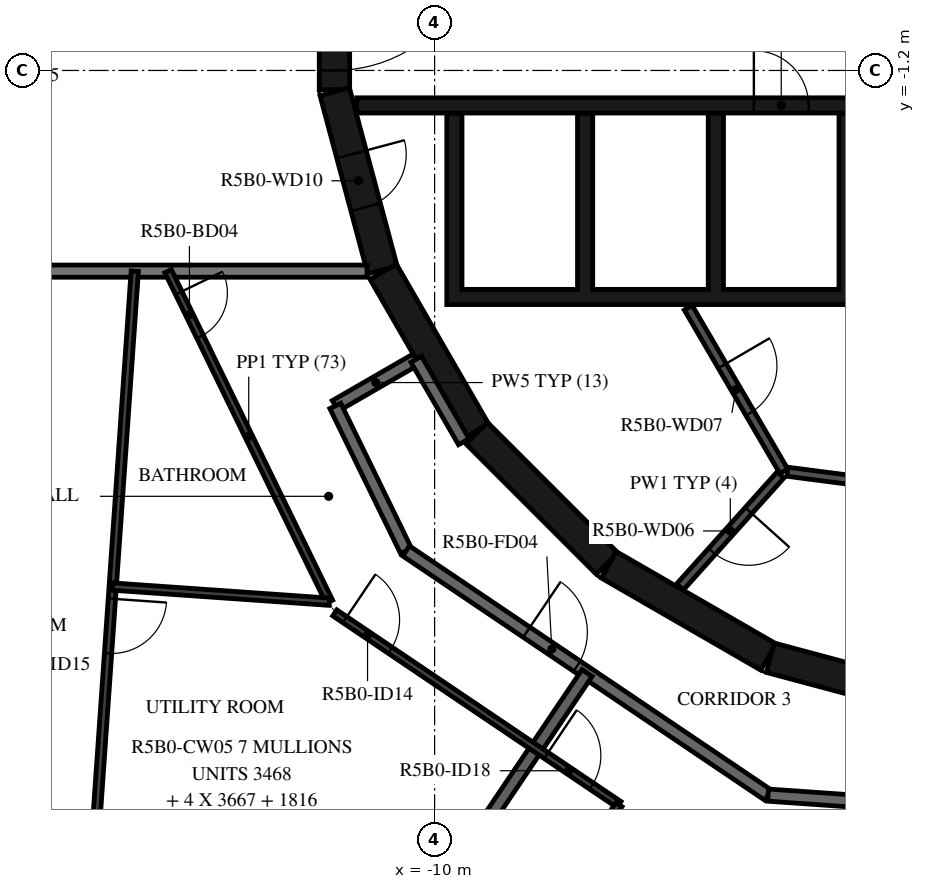
"""IFC4 building model, lengths in metres.
Left out: names, types, materials, properties, quantities, classifications, styles, units other than length and angle.
Written with IfcOpenShell. Run it as: python <this file> out.ifc"""

import sys

from ifc_helpers import new_model, si_unit, direction, frame, frame_2d, origin, place, context, subcontext, project, spatial, polyline, rectangle, outline, extrude, element, fill, save


model = new_model("IFC4")
c1 = context("Model", 3, precision=1e-05, world=origin(), true_north=direction((0.0, 1.0)))
c2 = subcontext(c1, "Body", "Model", "MODEL_VIEW")
j1 = project(units=[si_unit("LENGTHUNIT", "METRE"), si_unit("PLANEANGLEUNIT", "RADIAN")], contexts=[c1])
p1 = place(None, origin())
s1 = spatial("IfcSite", under=j1, at=p1, CompositionType="ELEMENT")
p2 = place(p1, origin())
s2 = spatial("IfcBuilding", under=s1, at=p2, CompositionType="ELEMENT")
p3 = place(p2, frame((0.0, 0.0, 202.4)))
s3 = spatial("IfcBuildingStorey", under=s2, at=p3, CompositionType="ELEMENT", Elevation=202.4)
p4 = place(p3, frame((-11.647, 1.516, 0.0), z_axis=(0.0, 0.0, 1.0), x_axis=(0.0, -1.0, 0.0)))
e1 = element("IfcWall", 1, at=p4, inside=s3, PredefinedType="SHEAR", context=c2, shape_type="SweptSolid", body=[
    extrude(rectangle(XDim=3.033, YDim=0.5, at=frame_2d((1.516, 0.0))), origin(), (0.0, 0.0, 1.0), 3.12),
])
p5 = place(p4, frame((0.316, 0.0, 0.0)))
e2 = element("IfcOpeningElement", 2, at=p5, cuts=e1, PredefinedType="OPENING", context=c2, shape_type="SweptSolid", body=[
    extrude(rectangle(XDim=2.4, YDim=2.1, at=frame_2d((1.2, 1.05))), frame((0.0, 0.26, 0.0), z_axis=(0.0, -1.0, 0.0), x_axis=(1.0, 0.0, 0.0)), (0.0, 0.0, 1.0), 0.52),
])
p6 = place(p3, frame((-11.643, -1.55, 0.0), z_axis=(0.0, 0.0, 1.0), x_axis=(0.258734743916, -0.965948410781, 0.0)))
e3 = element("IfcWall", 3, at=p6, inside=s3, PredefinedType="SHEAR", context=c2, shape_type="SweptSolid", body=[
    extrude(rectangle(XDim=3.033, YDim=0.5, at=frame_2d((1.516, 0.0))), origin(), (0.0, 0.0, 1.0), 3.12),
])
p7 = place(p6, frame((1.066, 0.0, 0.0)))
e4 = element("IfcOpeningElement", 4, at=p7, cuts=e3, PredefinedType="OPENING", context=c2, shape_type="SweptSolid", body=[
    extrude(rectangle(XDim=0.9, YDim=2.1, at=frame_2d((0.45, 1.05))), frame((0.0, 0.26, 0.0), z_axis=(0.0, -1.0, 0.0), x_axis=(1.0, 0.0, 0.0)), (0.0, 0.0, 1.0), 0.52),
])
p8 = place(p3, frame((-10.845, -4.51, 0.0), z_axis=(0.0, 0.0, 1.0), x_axis=(0.500087131594, -0.865975092491, 0.0)))
e5 = element("IfcWall", 5, at=p8, inside=s3, PredefinedType="SHEAR", context=c2, shape_type="SweptSolid", body=[
    extrude(rectangle(XDim=3.033, YDim=0.5, at=frame_2d((1.516, 0.0))), origin(), (0.0, 0.0, 1.0), 3.12),
])
p9 = place(p3, frame((-9.308, -7.164, 0.0), z_axis=(0.0, 0.0, 1.0), x_axis=(0.707106781187, -0.707106781187, 0.0)))
e6 = element("IfcWall", 6, at=p9, inside=s3, PredefinedType="SHEAR", context=c2, shape_type="SweptSolid", body=[
    extrude(rectangle(XDim=3.032, YDim=0.5, at=frame_2d((1.516, 0.0))), origin(), (0.0, 0.0, 1.0), 3.12),
])
for number, where, z_axis, x_axis in (
    (7, (-7.137, -9.329, 0.0), (0.0, 0.0, 1.0), (0.866, -0.5, 0.0)),
    (8, (-4.479, -10.858, 0.0), (0.0, 0.0, 1.0), (0.966, -0.259, 0.0)),
):
    element("IfcWall", number, at=place(p3, frame(where, z_axis=z_axis, x_axis=x_axis)), inside=s3, PredefinedType="SHEAR", context=c2, shape_type="SweptSolid", body=[
        extrude(rectangle(XDim=3.033, YDim=0.5, at=frame_2d((1.516, 0.0))), origin(), (0.0, 0.0, 1.0), 3.12),
    ])
p10 = place(p3, origin())
e9 = element("IfcWall", 9, at=p10, inside=s3, PredefinedType="SHEAR", context=c2, shape_type="SweptSolid", body=[
    extrude(outline(polyline([(9.8, -5.05), (9.8, -4.8), (9.8, -1.9), (9.55, -1.9), (9.55, -4.8), (7.65, -4.8), (7.65, -1.9), (7.4, -1.9), (7.4, -4.8), (5.5, -4.8), (5.5, -1.9), (5.25, -1.9), (5.25, -4.8), (3.35, -4.8), (3.35, -1.9), (3.1, -1.9), (3.1, -4.8), (1.2, -4.8), (1.2, -1.9), (0.95, -1.9), (0.95, -4.8), (-0.95, -4.8), (-0.95, -1.9), (-1.2, -1.9), (-1.2, -4.8), (-3.1, -4.8), (-3.1, -1.9), (-3.35, -1.9), (-3.35, -4.8), (-5.25, -4.8), (-5.25, -1.9), (-5.5, -1.9), (-5.5, -4.8), (-7.4, -4.8), (-7.4, -1.9), (-7.65, -1.9), (-7.65, -4.8), (-9.55, -4.8), (-9.55, -1.9), (-9.8, -1.9), (-9.8, -4.8), (-9.8, -5.05), (9.8, -5.05)])), origin(), (0.0, 0.0, 1.0), 3.12),
])
p11 = place(p3, frame((-11.28, -1.775, 0.0), z_axis=(0.0, 0.0, 1.0), x_axis=(1.0, 0.0, 0.0)))
e10 = element("IfcWall", 10, at=p11, inside=s3, PredefinedType="SHEAR", context=c2, shape_type="SweptSolid", body=[
    extrude(rectangle(XDim=14.38, YDim=0.25, at=frame_2d((7.19, 0.0))), origin(), (0.0, 0.0, 1.0), 3.12),
])
p12 = place(p11, frame((12.88, 0.0, 0.0)))
e11 = element("IfcOpeningElement", 11, at=p12, cuts=e10, PredefinedType="OPENING", context=c2, shape_type="SweptSolid", body=[
    extrude(rectangle(XDim=1.1, YDim=2.1, at=frame_2d((0.55, 1.05))), frame((0.0, 0.135, 0.0), z_axis=(0.0, -1.0, 0.0), x_axis=(1.0, 0.0, 0.0)), (0.0, 0.0, 1.0), 0.27),
])
p13 = place(p11, frame((6.53, 0.0, 0.0)))
e12 = element("IfcOpeningElement", 12, at=p13, cuts=e10, PredefinedType="OPENING", context=c2, shape_type="SweptSolid", body=[
    extrude(rectangle(XDim=0.9, YDim=2.1, at=frame_2d((0.45, 1.05))), frame((0.0, 0.135, 0.0), z_axis=(0.0, -1.0, 0.0), x_axis=(1.0, 0.0, 0.0)), (0.0, 0.0, 1.0), 0.27),
])
p14 = place(p11, frame((8.68, 0.0, 0.0)))
e13 = element("IfcOpeningElement", 13, at=p14, cuts=e10, PredefinedType="OPENING", context=c2, shape_type="SweptSolid", body=[
    extrude(rectangle(XDim=0.9, YDim=2.1, at=frame_2d((0.45, 1.05))), frame((0.0, 0.135, 0.0), z_axis=(0.0, -1.0, 0.0), x_axis=(1.0, 0.0, 0.0)), (0.0, 0.0, 1.0), 0.27),
])
p15 = place(p11, frame((10.83, 0.0, 0.0)))
e14 = element("IfcOpeningElement", 14, at=p15, cuts=e10, PredefinedType="OPENING", context=c2, shape_type="SweptSolid", body=[
    extrude(rectangle(XDim=0.9, YDim=2.1, at=frame_2d((0.45, 1.05))), frame((0.0, 0.135, 0.0), z_axis=(0.0, -1.0, 0.0), x_axis=(1.0, 0.0, 0.0)), (0.0, 0.0, 1.0), 0.27),
])
p16 = place(p3, frame((-5.829, -5.102, 0.0), z_axis=(0.0, 0.0, 1.0), x_axis=(0.504480008384, -0.863423373057, 0.0)))
e15 = element("IfcWall", 15, at=p16, inside=s3, PredefinedType="PARTITIONING", context=c2, shape_type="SweptSolid", body=[
    extrude(rectangle(XDim=3.115, YDim=0.15, at=frame_2d((1.558, 0.0))), origin(), (0.0, 0.0, 1.0), 3.12),
])
p17 = place(p16, frame((1.107, 0.0, 0.0)))
e16 = element("IfcOpeningElement", 16, at=p17, cuts=e15, PredefinedType="OPENING", context=c2, shape_type="SweptSolid", body=[
    extrude(rectangle(XDim=0.9, YDim=2.1, at=frame_2d((0.45, 1.05))), frame((0.0, 0.085, 0.0), z_axis=(0.0, -1.0, 0.0), x_axis=(1.0, 0.0, 0.0)), (0.0, 0.0, 1.0), 0.17),
])
p18 = place(p3, frame((-4.311, -7.851, 0.0), z_axis=(0.0, 0.0, 1.0), x_axis=(-0.667869133096, -0.744278725383, 0.0)))
e17 = element("IfcWall", 17, at=p18, inside=s3, PredefinedType="PARTITIONING", context=c2, shape_type="SweptSolid", body=[
    extrude(rectangle(XDim=2.476, YDim=0.15, at=frame_2d((1.238, 0.0))), origin(), (0.0, 0.0, 1.0), 3.12),
])
p19 = place(p18, frame((0.788, 0.0, 0.0)))
e18 = element("IfcOpeningElement", 18, at=p19, cuts=e17, PredefinedType="OPENING", context=c2, shape_type="SweptSolid", body=[
    extrude(rectangle(XDim=0.9, YDim=2.1, at=frame_2d((0.45, 1.05))), frame((0.0, 0.085, 0.0), z_axis=(0.0, -1.0, 0.0), x_axis=(1.0, 0.0, 0.0)), (0.0, 0.0, 1.0), 0.17),
])
p20 = place(p3, frame((-4.198, -7.799, 0.0), z_axis=(0.0, 0.0, 1.0), x_axis=(0.991686747293, -0.128675542523, 0.0)))
e19 = element("IfcWall", 19, at=p20, inside=s3, PredefinedType="PARTITIONING", context=c2, shape_type="SweptSolid", body=[
    extrude(rectangle(XDim=1.793, YDim=0.15, at=frame_2d((0.896, 0.0))), origin(), (0.0, 0.0, 1.0), 3.12),
])
p21 = place(p3, frame((-10.303, -5.949, 0.0), z_axis=(0.0, 0.0, 1.0), x_axis=(-0.866042588199, -0.499970234539, 0.0)))
e20 = element("IfcWall", 20, at=p21, inside=s3, PredefinedType="STANDARD", context=c2, shape_type="SweptSolid", body=[
    extrude(rectangle(XDim=1.535, YDim=0.2, at=frame_2d((0.768, 0.0))), origin(), (0.0, 0.0, 1.0), 3.12),
])
p22 = place(p3, frame((-11.633, -6.716, 0.0), z_axis=(0.0, 0.0, 1.0), x_axis=(0.438322116278, -0.898817958422, 0.0)))
e21 = element("IfcWall", 21, at=p22, inside=s3, PredefinedType="STANDARD", context=c2, shape_type="SweptSolid", body=[
    extrude(rectangle(XDim=2.654, YDim=0.2, at=frame_2d((1.327, 0.0))), origin(), (0.0, 0.0, 1.0), 3.12),
])
p23 = place(p3, frame((-10.47, -9.101, 0.0), z_axis=(0.0, 0.0, 1.0), x_axis=(0.829035841718, -0.559195469534, 0.0)))
e22 = element("IfcWall", 22, at=p23, inside=s3, PredefinedType="STANDARD", context=c2, shape_type="SweptSolid", body=[
    extrude(rectangle(XDim=7.181, YDim=0.2, at=frame_2d((3.591, 0.0))), origin(), (0.0, 0.0, 1.0), 3.12),
])
p24 = place(p23, frame((2.39, 0.0, 0.0)))
e23 = element("IfcOpeningElement", 23, at=p24, cuts=e22, PredefinedType="OPENING", context=c2, shape_type="SweptSolid", body=[
    extrude(rectangle(XDim=1.0, YDim=2.1, at=frame_2d((0.5, 1.05))), frame((0.0, 0.11, 0.0), z_axis=(0.0, -1.0, 0.0), x_axis=(1.0, 0.0, 0.0)), (0.0, 0.0, 1.0), 0.22),
])
p25 = place(p3, frame((-9.52, -7.305, 0.0), z_axis=(0.0, 0.0, 1.0), x_axis=(-0.500028278809, 0.866009076391, 0.0)))
e24 = element("IfcWall", 24, at=p25, inside=s3, PredefinedType="STANDARD", context=c2, shape_type="SweptSolid", body=[
    extrude(rectangle(XDim=1.566, YDim=0.2, at=frame_2d((0.783, 0.0))), origin(), (0.0, 0.0, 1.0), 3.12),
])
p26 = place(p3, frame((-4.517, -13.117, 0.0), z_axis=(0.0, 0.0, 1.0), x_axis=(0.997564669554, -0.069747616856, 0.0)))
e25 = element("IfcWall", 25, at=p26, inside=s3, PredefinedType="STANDARD", context=c2, shape_type="SweptSolid", body=[
    extrude(rectangle(XDim=6.885, YDim=0.2, at=frame_2d((3.443, 0.0))), origin(), (0.0, 0.0, 1.0), 3.12),
])
p27 = place(p26, frame((3.2, 0.0, 0.0)))
e26 = element("IfcOpeningElement", 26, at=p27, cuts=e25, PredefinedType="OPENING", context=c2, shape_type="SweptSolid", body=[
    extrude(rectangle(XDim=1.0, YDim=2.1, at=frame_2d((0.5, 1.05))), frame((0.0, 0.11, 0.0), z_axis=(0.0, -1.0, 0.0), x_axis=(1.0, 0.0, 0.0)), (0.0, 0.0, 1.0), 0.22),
])
p28 = place(p3, frame((-18.55, -4.5, 0.0), z_axis=(0.0, 0.0, 1.0), x_axis=(1.0, 0.0, 0.0)))
e27 = element("IfcWall", 27, at=p28, inside=s3, PredefinedType="STANDARD", context=c2, shape_type="SweptSolid", body=[
    extrude(rectangle(XDim=7.438, YDim=0.2, at=frame_2d((3.719, 0.0))), origin(), (0.0, 0.0, 1.0), 3.12),
])
p29 = place(p3, frame((-10.066, -14.924, 0.0), z_axis=(0.0, 0.0, 1.0), x_axis=(0.559173899945, 0.829050390278, 0.0)))
e28 = element("IfcWall", 28, at=p29, inside=s3, PredefinedType="STANDARD", context=c2, shape_type="SweptSolid", body=[
    extrude(rectangle(XDim=4.601, YDim=0.2, at=frame_2d((2.301, 0.0))), origin(), (0.0, 0.0, 1.0), 3.12),
])
p30 = place(p3, frame((-14.383, -4.5, 0.0), z_axis=(0.0, 0.0, 1.0), x_axis=(0.438393414895, -0.898783185077, 0.0)))
e29 = element("IfcWall", 29, at=p30, inside=s3, PredefinedType="PARTITIONING", context=c2, shape_type="SweptSolid", body=[
    extrude(rectangle(XDim=6.049, YDim=0.12, at=frame_2d((3.024, 0.0))), origin(), (0.0, 0.0, 1.0), 3.12),
])
p31 = place(p30, frame((0.4, 0.0, 0.0)))
e30 = element("IfcOpeningElement", 30, at=p31, cuts=e29, PredefinedType="OPENING", context=c2, shape_type="SweptSolid", body=[
    extrude(rectangle(XDim=0.8, YDim=2.1, at=frame_2d((0.4, 1.05))), frame((0.0, 0.07, 0.0), z_axis=(0.0, -1.0, 0.0), x_axis=(1.0, 0.0, 0.0)), (0.0, 0.0, 1.0), 0.14),
])
p32 = place(p3, frame((-11.642, -10.12, 0.0), z_axis=(0.0, 0.0, 1.0), x_axis=(0.829033377599, -0.559199122698, 0.0)))
e31 = element("IfcWall", 31, at=p32, inside=s3, PredefinedType="PARTITIONING", context=c2, shape_type="SweptSolid", body=[
    extrude(rectangle(XDim=5.638, YDim=0.12, at=frame_2d((2.819, 0.0))), origin(), (0.0, 0.0, 1.0), 3.12),
])
p33 = place(p32, frame((0.2, 0.0, 0.0)))
e32 = element("IfcOpeningElement", 32, at=p33, cuts=e31, PredefinedType="OPENING", context=c2, shape_type="SweptSolid", body=[
    extrude(rectangle(XDim=0.9, YDim=2.1, at=frame_2d((0.45, 1.05))), frame((0.0, 0.07, 0.0), z_axis=(0.0, -1.0, 0.0), x_axis=(1.0, 0.0, 0.0)), (0.0, 0.0, 1.0), 0.14),
])
p34 = place(p32, frame((4.192, 0.0, 0.0)))
e33 = element("IfcOpeningElement", 33, at=p34, cuts=e31, PredefinedType="OPENING", context=c2, shape_type="SweptSolid", body=[
    extrude(rectangle(XDim=0.9, YDim=2.1, at=frame_2d((0.45, 1.05))), frame((0.0, 0.07, 0.0), z_axis=(0.0, -1.0, 0.0), x_axis=(1.0, 0.0, 0.0)), (0.0, 0.0, 1.0), 0.14),
])
p35 = place(p3, frame((-14.931, -4.5, 0.0), z_axis=(0.0, 0.0, 1.0), x_axis=(-0.069751708439, -0.997564383471, 0.0)))
e34 = element("IfcWall", 34, at=p35, inside=s3, PredefinedType="PARTITIONING", context=c2, shape_type="SweptSolid", body=[
    extrude(rectangle(XDim=11.894, YDim=0.12, at=frame_2d((5.947, 0.0))), origin(), (0.0, 0.0, 1.0), 3.12),
])
p36 = place(p35, frame((5.4, 0.0, 0.0)))
e35 = element("IfcOpeningElement", 35, at=p36, cuts=e34, PredefinedType="OPENING", context=c2, shape_type="SweptSolid", body=[
    extrude(rectangle(XDim=0.9, YDim=2.1, at=frame_2d((0.45, 1.05))), frame((0.0, 0.07, 0.0), z_axis=(0.0, -1.0, 0.0), x_axis=(1.0, 0.0, 0.0)), (0.0, 0.0, 1.0), 0.14),
])
p37 = place(p3, frame((-15.294, -9.688, 0.0), z_axis=(0.0, 0.0, 1.0), x_axis=(0.997565819809, -0.069731163391, 0.0)))
e36 = element("IfcWall", 36, at=p37, inside=s3, PredefinedType="PARTITIONING", context=c2, shape_type="SweptSolid", body=[
    extrude(rectangle(XDim=3.571, YDim=0.12, at=frame_2d((1.786, 0.0))), origin(), (0.0, 0.0, 1.0), 3.12),
])
p38 = place(p3, frame((-6.968, -13.273, 0.0), z_axis=(0.0, 0.0, 1.0), x_axis=(-0.559283007371, -0.828976789582, 0.0)))
e37 = element("IfcWall", 37, at=p38, inside=s3, PredefinedType="PARTITIONING", context=c2, shape_type="SweptSolid", body=[
    extrude(rectangle(XDim=1.325, YDim=0.12, at=frame_2d((0.663, 0.0))), origin(), (0.0, 0.0, 1.0), 3.12),
])
p39 = place(p5, origin())
e38 = element("IfcDoor", 38, at=p39, inside=s3, OperationType="DOUBLE_DOOR_SINGLE_SWING", PredefinedType="DOOR", context=c2, shape_type="SweptSolid", body=[
    extrude(rectangle(XDim=2.4, YDim=2.1, at=frame_2d((1.2, 1.05))), frame((0.0, 0.025, 0.0), z_axis=(0.0, -1.0, 0.0), x_axis=(1.0, 0.0, 0.0)), (0.0, 0.0, 1.0), 0.05),
])
fill(e2, e38)
p40 = place(p13, origin())
e39 = element("IfcDoor", 39, at=p40, inside=s3, OperationType="SINGLE_SWING_LEFT", PredefinedType="DOOR", context=c2, shape_type="SweptSolid", body=[
    extrude(rectangle(XDim=0.9, YDim=2.1, at=frame_2d((0.45, 1.05))), frame((0.0, 0.025, 0.0), z_axis=(0.0, -1.0, 0.0), x_axis=(1.0, 0.0, 0.0)), (0.0, 0.0, 1.0), 0.05),
])
fill(e12, e39)
p41 = place(p19, origin())
e40 = element("IfcDoor", 40, at=p41, inside=s3, OperationType="SINGLE_SWING_RIGHT", PredefinedType="DOOR", context=c2, shape_type="SweptSolid", body=[
    extrude(rectangle(XDim=0.9, YDim=2.1, at=frame_2d((0.45, 1.05))), frame((0.0, 0.025, 0.0), z_axis=(0.0, -1.0, 0.0), x_axis=(1.0, 0.0, 0.0)), (0.0, 0.0, 1.0), 0.05),
])
fill(e18, e40)
p42 = place(p17, origin())
e41 = element("IfcDoor", 41, at=p42, inside=s3, OperationType="SINGLE_SWING_LEFT", PredefinedType="DOOR", context=c2, shape_type="SweptSolid", body=[
    extrude(rectangle(XDim=0.9, YDim=2.1, at=frame_2d((0.45, 1.05))), frame((0.0, 0.025, 0.0), z_axis=(0.0, -1.0, 0.0), x_axis=(1.0, 0.0, 0.0)), (0.0, 0.0, 1.0), 0.05),
])
fill(e16, e41)
p43 = place(p7, origin())
e42 = element("IfcDoor", 42, at=p43, inside=s3, OperationType="SINGLE_SWING_RIGHT", PredefinedType="DOOR", context=c2, shape_type="SweptSolid", body=[
    extrude(rectangle(XDim=0.9, YDim=2.1, at=frame_2d((0.45, 1.05))), frame((0.0, 0.025, 0.0), z_axis=(0.0, -1.0, 0.0), x_axis=(1.0, 0.0, 0.0)), (0.0, 0.0, 1.0), 0.05),
])
fill(e4, e42)
p44 = place(p24, origin())
e43 = element("IfcDoor", 43, at=p44, inside=s3, OperationType="SINGLE_SWING_RIGHT", PredefinedType="DOOR", context=c2, shape_type="SweptSolid", body=[
    extrude(rectangle(XDim=1.0, YDim=2.1, at=frame_2d((0.5, 1.05))), frame((0.0, 0.025, 0.0), z_axis=(0.0, -1.0, 0.0), x_axis=(1.0, 0.0, 0.0)), (0.0, 0.0, 1.0), 0.05),
])
fill(e23, e43)
p45 = place(p31, origin())
e44 = element("IfcDoor", 44, at=p45, inside=s3, OperationType="SINGLE_SWING_RIGHT", PredefinedType="DOOR", context=c2, shape_type="SweptSolid", body=[
    extrude(rectangle(XDim=0.8, YDim=2.1, at=frame_2d((0.4, 1.05))), frame((0.0, 0.025, 0.0), z_axis=(0.0, -1.0, 0.0), x_axis=(1.0, 0.0, 0.0)), (0.0, 0.0, 1.0), 0.05),
])
fill(e30, e44)
p46 = place(p33, origin())
e45 = element("IfcDoor", 45, at=p46, inside=s3, OperationType="SINGLE_SWING_RIGHT", PredefinedType="DOOR", context=c2, shape_type="SweptSolid", body=[
    extrude(rectangle(XDim=0.9, YDim=2.1, at=frame_2d((0.45, 1.05))), frame((0.0, 0.025, 0.0), z_axis=(0.0, -1.0, 0.0), x_axis=(1.0, 0.0, 0.0)), (0.0, 0.0, 1.0), 0.05),
])
fill(e32, e45)
p47 = place(p36, origin())
e46 = element("IfcDoor", 46, at=p47, inside=s3, OperationType="SINGLE_SWING_RIGHT", PredefinedType="DOOR", context=c2, shape_type="SweptSolid", body=[
    extrude(rectangle(XDim=0.9, YDim=2.1, at=frame_2d((0.45, 1.05))), frame((0.0, 0.025, 0.0), z_axis=(0.0, -1.0, 0.0), x_axis=(1.0, 0.0, 0.0)), (0.0, 0.0, 1.0), 0.05),
])
fill(e35, e46)
p48 = place(p34, origin())
e47 = element("IfcDoor", 47, at=p48, inside=s3, OperationType="SINGLE_SWING_LEFT", PredefinedType="DOOR", context=c2, shape_type="SweptSolid", body=[
    extrude(rectangle(XDim=0.9, YDim=2.1, at=frame_2d((0.45, 1.05))), frame((0.0, 0.025, 0.0), z_axis=(0.0, -1.0, 0.0), x_axis=(1.0, 0.0, 0.0)), (0.0, 0.0, 1.0), 0.05),
])
fill(e33, e47)
save(model, sys.argv[1])
